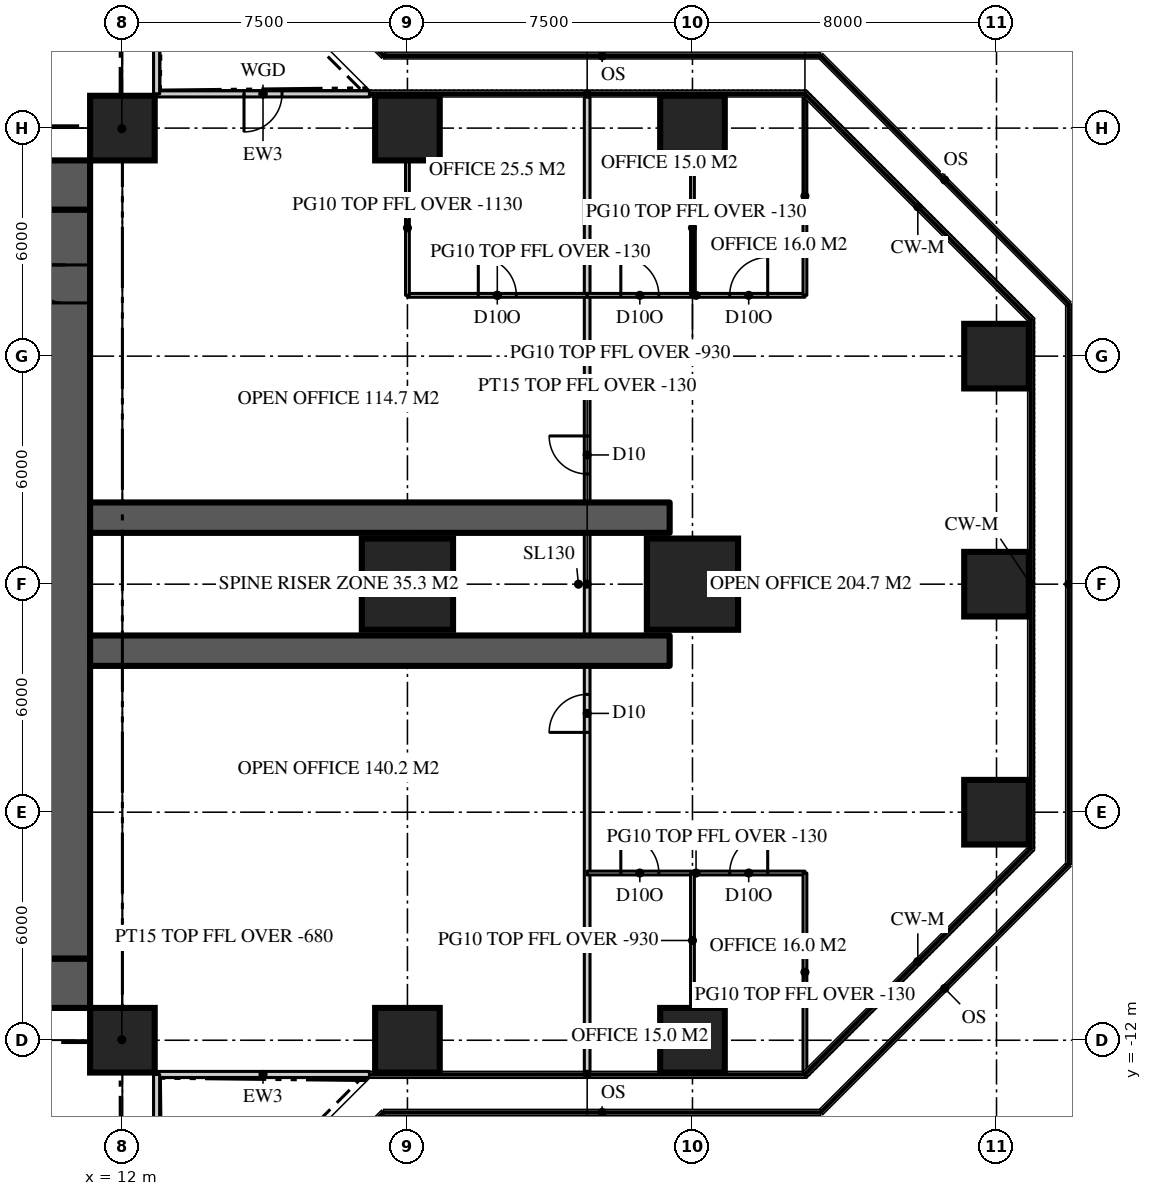
"""IFC4 building model, lengths in metres.
Left out: names, types, materials, properties, quantities, classifications, styles, units other than length and angle.
Written with IfcOpenShell. Run it as: python <this file> out.ifc"""

import sys

from ifc_helpers import new_model, si_unit, direction, frame, frame_2d, origin, origin_2d, place, context, subcontext, project, spatial, rectangle, extrude, element, fill, save


model = new_model("IFC4")
c1 = context("Model", 3, precision=1e-05, world=origin(), true_north=direction((0.0, 1.0)))
c2 = subcontext(c1, "Body", "Model", "MODEL_VIEW")
j1 = project(units=[si_unit("LENGTHUNIT", "METRE"), si_unit("PLANEANGLEUNIT", "RADIAN")], contexts=[c1])
p1 = place(None, origin())
s1 = spatial("IfcSite", under=j1, at=p1, CompositionType="ELEMENT")
p2 = place(p1, origin())
s2 = spatial("IfcBuilding", under=s1, at=p2, CompositionType="ELEMENT")
p3 = place(p2, frame((0.0, 0.0, 124.2)))
s3 = spatial("IfcBuildingStorey", under=s2, at=p3, CompositionType="ELEMENT", Elevation=124.2)
p4 = place(p3, frame((-11.15, 10.5, 0.0), z_axis=(0.0, 0.0, 1.0), x_axis=(1.0, 0.0, 0.0)))
e1 = element("IfcWall", 1, at=p4, inside=s3, PredefinedType="SHEAR", context=c2, shape_type="SweptSolid", body=[
    extrude(rectangle(XDim=22.3, YDim=1.3, at=frame_2d((11.15, 0.0))), origin(), (0.0, 0.0, 1.0), 3.9),
])
p5 = place(p4, frame((4.25, 0.0, 0.0)))
e2 = element("IfcOpeningElement", 2, at=p5, cuts=e1, PredefinedType="OPENING", context=c2, shape_type="SweptSolid", body=[
    extrude(rectangle(XDim=1.8, YDim=2.2, at=frame_2d((0.9, 1.1))), frame((0.0, 0.66, 0.0), z_axis=(0.0, -1.0, 0.0), x_axis=(1.0, 0.0, 0.0)), (0.0, 0.0, 1.0), 1.32),
])
p6 = place(p4, frame((16.25, 0.0, 0.0)))
e3 = element("IfcOpeningElement", 3, at=p6, cuts=e1, PredefinedType="OPENING", context=c2, shape_type="SweptSolid", body=[
    extrude(rectangle(XDim=1.8, YDim=2.2, at=frame_2d((0.9, 1.1))), frame((0.0, 0.66, 0.0), z_axis=(0.0, -1.0, 0.0), x_axis=(1.0, 0.0, 0.0)), (0.0, 0.0, 1.0), 1.32),
])
p7 = place(p3, frame((11.15, -10.5, 0.0), z_axis=(0.0, 0.0, 1.0), x_axis=(-1.0, 0.0, 0.0)))
e4 = element("IfcWall", 4, at=p7, inside=s3, PredefinedType="SHEAR", context=c2, shape_type="SweptSolid", body=[
    extrude(rectangle(XDim=22.3, YDim=1.3, at=frame_2d((11.15, 0.0))), origin(), (0.0, 0.0, 1.0), 3.9),
])
p8 = place(p7, frame((16.25, 0.0, 0.0)))
e5 = element("IfcOpeningElement", 5, at=p8, cuts=e4, PredefinedType="OPENING", context=c2, shape_type="SweptSolid", body=[
    extrude(rectangle(XDim=1.8, YDim=2.2, at=frame_2d((0.9, 1.1))), frame((0.0, 0.66, 0.0), z_axis=(0.0, -1.0, 0.0), x_axis=(1.0, 0.0, 0.0)), (0.0, 0.0, 1.0), 1.32),
])
p9 = place(p7, frame((4.25, 0.0, 0.0)))
e6 = element("IfcOpeningElement", 6, at=p9, cuts=e4, PredefinedType="OPENING", context=c2, shape_type="SweptSolid", body=[
    extrude(rectangle(XDim=1.8, YDim=2.2, at=frame_2d((0.9, 1.1))), frame((0.0, 0.66, 0.0), z_axis=(0.0, -1.0, 0.0), x_axis=(1.0, 0.0, 0.0)), (0.0, 0.0, 1.0), 1.32),
])
p10 = place(p3, frame((10.5, -9.85, 0.0), z_axis=(0.0, 0.0, 1.0), x_axis=(0.0, 1.0, 0.0)))
e7 = element("IfcWall", 7, at=p10, inside=s3, PredefinedType="SHEAR", context=c2, shape_type="SweptSolid", body=[
    extrude(rectangle(XDim=19.7, YDim=1.3, at=frame_2d((9.85, 0.0))), origin(), (0.0, 0.0, 1.0), 3.9),
])
p11 = place(p10, frame((17.25, 0.0, 0.0)))
e8 = element("IfcOpeningElement", 8, at=p11, cuts=e7, PredefinedType="OPENING", context=c2, shape_type="SweptSolid", body=[
    extrude(rectangle(XDim=1.0, YDim=2.2, at=frame_2d((0.5, 1.1))), frame((0.0, 0.66, 0.0), z_axis=(0.0, -1.0, 0.0), x_axis=(1.0, 0.0, 0.0)), (0.0, 0.0, 1.0), 1.32),
])
for number, where, z_axis, x_axis in (
    (9, (11.15, -1.75, 0.0), (0.0, 0.0, 1.0), (1.0, 0.0, 0.0)),
    (10, (11.15, 1.75, 0.0), (0.0, 0.0, 1.0), (1.0, 0.0, 0.0)),
):
    element("IfcWall", number, at=place(p3, frame(where, z_axis=z_axis, x_axis=x_axis)), inside=s3, PredefinedType="SHEAR", context=c2, shape_type="SweptSolid", body=[
        extrude(rectangle(XDim=15.25, YDim=0.8, at=frame_2d((7.625, 0.0))), origin(), (0.0, 0.0, 1.0), 3.9),
    ])
for number, where, z_axis, x_axis in (
    (11, (12.0, -12.0, 0.0), (0.0, 0.0, 1.0), (1.0, 0.0, 0.0)),
    (12, (19.5, -12.0, 0.0), (0.0, 0.0, 1.0), (1.0, 0.0, 0.0)),
    (13, (27.0, -12.0, 0.0), (0.0, 0.0, 1.0), (1.0, 0.0, 0.0)),
    (14, (35.0, -6.0, 0.0), (0.0, 0.0, 1.0), (1.0, 0.0, 0.0)),
):
    element("IfcColumn", number, at=place(p3, frame(where, z_axis=z_axis, x_axis=x_axis)), inside=s3, PredefinedType="COLUMN", context=c2, shape_type="SweptSolid", body=[
        extrude(rectangle(XDim=1.7, YDim=1.7, at=origin_2d()), origin(), (0.0, 0.0, 1.0), 3.9),
    ])
for number, where, z_axis, x_axis in (
    (15, (19.5, 0.0, 0.0), (0.0, 0.0, 1.0), (1.0, 0.0, 0.0)),
    (16, (27.0, 0.0, 0.0), (0.0, 0.0, 1.0), (1.0, 0.0, 0.0)),
):
    element("IfcColumn", number, at=place(p3, frame(where, z_axis=z_axis, x_axis=x_axis)), inside=s3, PredefinedType="COLUMN", context=c2, shape_type="SweptSolid", body=[
        extrude(rectangle(XDim=2.4, YDim=2.4, at=origin_2d()), origin(), (0.0, 0.0, 1.0), 3.9),
    ])
for number, where, z_axis, x_axis in (
    (17, (35.0, 0.0, 0.0), (0.0, 0.0, 1.0), (1.0, 0.0, 0.0)),
    (18, (35.0, 6.0, 0.0), (0.0, 0.0, 1.0), (1.0, 0.0, 0.0)),
    (19, (12.0, 12.0, 0.0), (0.0, 0.0, 1.0), (1.0, 0.0, 0.0)),
    (20, (19.5, 12.0, 0.0), (0.0, 0.0, 1.0), (1.0, 0.0, 0.0)),
    (21, (27.0, 12.0, 0.0), (0.0, 0.0, 1.0), (1.0, 0.0, 0.0)),
):
    element("IfcColumn", number, at=place(p3, frame(where, z_axis=z_axis, x_axis=x_axis)), inside=s3, PredefinedType="COLUMN", context=c2, shape_type="SweptSolid", body=[
        extrude(rectangle(XDim=1.7, YDim=1.7, at=origin_2d()), origin(), (0.0, 0.0, 1.0), 3.9),
    ])
p12 = place(p3, frame((12.9, -12.9, 0.0), z_axis=(0.0, 0.0, 1.0), x_axis=(1.0, 0.0, 0.0)))
e22 = element("IfcWall", 22, at=p12, inside=s3, PredefinedType="SOLIDWALL", context=c2, shape_type="SweptSolid", body=[
    extrude(rectangle(XDim=5.6, YDim=0.16, at=frame_2d((2.8, 0.0))), origin(), (0.0, 0.0, 1.0), 3.77),
])
p13 = place(p3, frame((18.5, 12.9, 0.0), z_axis=(0.0, 0.0, 1.0), x_axis=(-1.0, 0.0, 0.0)))
e23 = element("IfcWall", 23, at=p13, inside=s3, PredefinedType="SOLIDWALL", context=c2, shape_type="SweptSolid", body=[
    extrude(rectangle(XDim=5.6, YDim=0.16, at=frame_2d((2.8, 0.0))), origin(), (0.0, 0.0, 1.0), 3.77),
])
p14 = place(p13, frame((2.3, 0.0, 0.0)))
e24 = element("IfcOpeningElement", 24, at=p14, cuts=e23, PredefinedType="OPENING", context=c2, shape_type="SweptSolid", body=[
    extrude(rectangle(XDim=1.0, YDim=2.2, at=frame_2d((0.5, 1.1))), frame((0.0, 0.09, 0.0), z_axis=(0.0, -1.0, 0.0), x_axis=(1.0, 0.0, 0.0)), (0.0, 0.0, 1.0), 0.18),
])
p15 = place(p3, frame((12.9, 12.9, 0.0), z_axis=(0.0, 0.0, 1.0), x_axis=(0.0, 1.0, 0.0)))
e25 = element("IfcWall", 25, at=p15, inside=s3, PredefinedType="SOLIDWALL", context=c2, shape_type="SweptSolid", body=[
    extrude(rectangle(XDim=5.6, YDim=0.16, at=frame_2d((2.8, 0.0))), origin(), (0.0, 0.0, 1.0), 3.77),
])
p16 = place(p3, frame((12.9, -18.5, 0.0), z_axis=(0.0, 0.0, 1.0), x_axis=(0.0, 1.0, 0.0)))
e26 = element("IfcWall", 26, at=p16, inside=s3, PredefinedType="SOLIDWALL", context=c2, shape_type="SweptSolid", body=[
    extrude(rectangle(XDim=5.6, YDim=0.16, at=frame_2d((2.8, 0.0))), origin(), (0.0, 0.0, 1.0), 3.77),
])
p17 = place(p16, frame((2.3, 0.0, 0.0)))
e27 = element("IfcOpeningElement", 27, at=p17, cuts=e26, PredefinedType="OPENING", context=c2, shape_type="SweptSolid", body=[
    extrude(rectangle(XDim=1.0, YDim=2.2, at=frame_2d((0.5, 1.1))), frame((0.0, 0.09, 0.0), z_axis=(0.0, -1.0, 0.0), x_axis=(1.0, 0.0, 0.0)), (0.0, 0.0, 1.0), 0.18),
])
p18 = place(p3, frame((24.229, -12.82, 0.0), z_axis=(0.0, 0.0, 1.0), x_axis=(0.0, 1.0, 0.0)))
e28 = element("IfcWall", 28, at=p18, inside=s3, PredefinedType="PARTITIONING", context=c2, shape_type="SweptSolid", body=[
    extrude(rectangle(XDim=25.64, YDim=0.15, at=frame_2d((12.82, 0.0))), origin(), (0.0, 0.0, 1.0), 3.77),
])
p19 = place(p18, frame((15.72, 0.0, 0.0)))
e29 = element("IfcOpeningElement", 29, at=p19, cuts=e28, PredefinedType="OPENING", context=c2, shape_type="SweptSolid", body=[
    extrude(rectangle(XDim=1.0, YDim=2.2, at=frame_2d((0.5, 1.1))), frame((0.0, 0.085, 0.0), z_axis=(0.0, -1.0, 0.0), x_axis=(1.0, 0.0, 0.0)), (0.0, 0.0, 1.0), 0.17),
])
p20 = place(p18, frame((8.92, 0.0, 0.0)))
e30 = element("IfcOpeningElement", 30, at=p20, cuts=e28, PredefinedType="OPENING", context=c2, shape_type="SweptSolid", body=[
    extrude(rectangle(XDim=1.0, YDim=2.2, at=frame_2d((0.5, 1.1))), frame((0.0, 0.085, 0.0), z_axis=(0.0, -1.0, 0.0), x_axis=(1.0, 0.0, 0.0)), (0.0, 0.0, 1.0), 0.17),
])
p21 = place(p3, frame((19.5, 7.6, 0.0), z_axis=(0.0, 0.0, 1.0), x_axis=(1.0, 0.0, 0.0)))
e31 = element("IfcWall", 31, at=p21, inside=s3, PredefinedType="PARTITIONING", context=c2, shape_type="SweptSolid", body=[
    extrude(rectangle(XDim=4.729, YDim=0.1, at=frame_2d((2.365, 0.0))), origin(), (0.0, 0.0, 1.0), 3.77),
])
p22 = place(p21, frame((1.865, 0.0, 0.0)))
e32 = element("IfcOpeningElement", 32, at=p22, cuts=e31, PredefinedType="OPENING", context=c2, shape_type="SweptSolid", body=[
    extrude(rectangle(XDim=1.0, YDim=2.2, at=frame_2d((0.5, 1.1))), frame((0.0, 0.06, 0.0), z_axis=(0.0, -1.0, 0.0), x_axis=(1.0, 0.0, 0.0)), (0.0, 0.0, 1.0), 0.12),
])
p23 = place(p3, frame((24.229, 7.6, 0.0), z_axis=(0.0, 0.0, 1.0), x_axis=(1.0, 0.0, 0.0)))
e33 = element("IfcWall", 33, at=p23, inside=s3, PredefinedType="PARTITIONING", context=c2, shape_type="SweptSolid", body=[
    extrude(rectangle(XDim=5.73, YDim=0.1, at=frame_2d((2.865, 0.0))), origin(), (0.0, 0.0, 1.0), 3.77),
])
p24 = place(p23, frame((0.885, 0.0, 0.0)))
e34 = element("IfcOpeningElement", 34, at=p24, cuts=e33, PredefinedType="OPENING", context=c2, shape_type="SweptSolid", body=[
    extrude(rectangle(XDim=1.0, YDim=2.2, at=frame_2d((0.5, 1.1))), frame((0.0, 0.06, 0.0), z_axis=(0.0, -1.0, 0.0), x_axis=(1.0, 0.0, 0.0)), (0.0, 0.0, 1.0), 0.12),
])
p25 = place(p23, frame((3.75, 0.0, 0.0)))
e35 = element("IfcOpeningElement", 35, at=p25, cuts=e33, PredefinedType="OPENING", context=c2, shape_type="SweptSolid", body=[
    extrude(rectangle(XDim=1.0, YDim=2.2, at=frame_2d((0.5, 1.1))), frame((0.0, 0.06, 0.0), z_axis=(0.0, -1.0, 0.0), x_axis=(1.0, 0.0, 0.0)), (0.0, 0.0, 1.0), 0.12),
])
p26 = place(p3, frame((19.5, 7.6, 0.0), z_axis=(0.0, 0.0, 1.0), x_axis=(0.0, 1.0, 0.0)))
e36 = element("IfcWall", 36, at=p26, inside=s3, PredefinedType="PARTITIONING", context=c2, shape_type="SweptSolid", body=[
    extrude(rectangle(XDim=3.55, YDim=0.1, at=frame_2d((1.775, 0.0))), origin(), (0.0, 0.0, 1.0), 2.77),
])
p27 = place(p3, frame((27.0, 7.6, 0.0), z_axis=(0.0, 0.0, 1.0), x_axis=(0.0, 1.0, 0.0)))
e37 = element("IfcWall", 37, at=p27, inside=s3, PredefinedType="PARTITIONING", context=c2, shape_type="SweptSolid", body=[
    extrude(rectangle(XDim=3.55, YDim=0.1, at=frame_2d((1.775, 0.0))), origin(), (0.0, 0.0, 1.0), 2.97),
])
p28 = place(p3, frame((29.959, 7.6, 0.0), z_axis=(0.0, 0.0, 1.0), x_axis=(0.0, 1.0, 0.0)))
e38 = element("IfcWall", 38, at=p28, inside=s3, PredefinedType="PARTITIONING", context=c2, shape_type="SweptSolid", body=[
    extrude(rectangle(XDim=5.22, YDim=0.1, at=frame_2d((2.61, 0.0))), origin(), (0.0, 0.0, 1.0), 3.77),
])
p29 = place(p3, frame((24.229, -7.6, 0.0), z_axis=(0.0, 0.0, 1.0), x_axis=(1.0, 0.0, 0.0)))
e39 = element("IfcWall", 39, at=p29, inside=s3, PredefinedType="PARTITIONING", context=c2, shape_type="SweptSolid", body=[
    extrude(rectangle(XDim=5.73, YDim=0.1, at=frame_2d((2.865, 0.0))), origin(), (0.0, 0.0, 1.0), 3.77),
])
p30 = place(p29, frame((0.885, 0.0, 0.0)))
e40 = element("IfcOpeningElement", 40, at=p30, cuts=e39, PredefinedType="OPENING", context=c2, shape_type="SweptSolid", body=[
    extrude(rectangle(XDim=1.0, YDim=2.2, at=frame_2d((0.5, 1.1))), frame((0.0, 0.06, 0.0), z_axis=(0.0, -1.0, 0.0), x_axis=(1.0, 0.0, 0.0)), (0.0, 0.0, 1.0), 0.12),
])
p31 = place(p29, frame((3.75, 0.0, 0.0)))
e41 = element("IfcOpeningElement", 41, at=p31, cuts=e39, PredefinedType="OPENING", context=c2, shape_type="SweptSolid", body=[
    extrude(rectangle(XDim=1.0, YDim=2.2, at=frame_2d((0.5, 1.1))), frame((0.0, 0.06, 0.0), z_axis=(0.0, -1.0, 0.0), x_axis=(1.0, 0.0, 0.0)), (0.0, 0.0, 1.0), 0.12),
])
p32 = place(p3, frame((27.0, -7.6, 0.0), z_axis=(0.0, 0.0, 1.0), x_axis=(0.0, -1.0, 0.0)))
e42 = element("IfcWall", 42, at=p32, inside=s3, PredefinedType="PARTITIONING", context=c2, shape_type="SweptSolid", body=[
    extrude(rectangle(XDim=3.55, YDim=0.1, at=frame_2d((1.775, 0.0))), origin(), (0.0, 0.0, 1.0), 2.97),
])
p33 = place(p3, frame((29.959, -7.6, 0.0), z_axis=(0.0, 0.0, 1.0), x_axis=(0.0, -1.0, 0.0)))
e43 = element("IfcWall", 43, at=p33, inside=s3, PredefinedType="PARTITIONING", context=c2, shape_type="SweptSolid", body=[
    extrude(rectangle(XDim=5.22, YDim=0.1, at=frame_2d((2.61, 0.0))), origin(), (0.0, 0.0, 1.0), 3.77),
])
for number, where, z_axis, x_axis in (
    (44, (11.15, 11.15, 0.0), (0.0, 0.0, 1.0), (0.707, 0.707, 0.0)),
    (45, (11.15, -11.15, 0.0), (0.0, 0.0, 1.0), (0.707, -0.707, 0.0)),
):
    element("IfcWall", number, at=place(p3, frame(where, z_axis=z_axis, x_axis=x_axis)), inside=s3, PredefinedType="PARTITIONING", context=c2, shape_type="SweptSolid", body=[
        extrude(rectangle(XDim=2.362, YDim=0.15, at=frame_2d((1.181, 0.0))), origin(), (0.0, 0.0, 1.0), 3.22),
    ])
p34 = place(p14, origin())
e46 = element("IfcDoor", 46, at=p34, inside=s3, OperationType="SINGLE_SWING_RIGHT", PredefinedType="DOOR", context=c2, shape_type="SweptSolid", body=[
    extrude(rectangle(XDim=1.0, YDim=2.2, at=frame_2d((0.5, 1.1))), frame((0.0, 0.025, 0.0), z_axis=(0.0, -1.0, 0.0), x_axis=(1.0, 0.0, 0.0)), (0.0, 0.0, 1.0), 0.05),
])
fill(e24, e46)
p35 = place(p11, origin())
e47 = element("IfcDoor", 47, at=p35, inside=s3, OperationType="SINGLE_SWING_RIGHT", PredefinedType="DOOR", context=c2, shape_type="SweptSolid", body=[
    extrude(rectangle(XDim=1.0, YDim=2.2, at=frame_2d((0.5, 1.1))), frame((0.0, 0.025, 0.0), z_axis=(0.0, -1.0, 0.0), x_axis=(1.0, 0.0, 0.0)), (0.0, 0.0, 1.0), 0.05),
])
fill(e8, e47)
p36 = place(p19, origin())
e48 = element("IfcDoor", 48, at=p36, inside=s3, OperationType="SINGLE_SWING_RIGHT", PredefinedType="DOOR", context=c2, shape_type="SweptSolid", body=[
    extrude(rectangle(XDim=1.0, YDim=2.2, at=frame_2d((0.5, 1.1))), frame((0.0, 0.025, 0.0), z_axis=(0.0, -1.0, 0.0), x_axis=(1.0, 0.0, 0.0)), (0.0, 0.0, 1.0), 0.05),
])
fill(e29, e48)
p37 = place(p20, origin())
e49 = element("IfcDoor", 49, at=p37, inside=s3, OperationType="SINGLE_SWING_LEFT", PredefinedType="DOOR", context=c2, shape_type="SweptSolid", body=[
    extrude(rectangle(XDim=1.0, YDim=2.2, at=frame_2d((0.5, 1.1))), frame((0.0, 0.025, 0.0), z_axis=(0.0, -1.0, 0.0), x_axis=(1.0, 0.0, 0.0)), (0.0, 0.0, 1.0), 0.05),
])
fill(e30, e49)
p38 = place(p22, origin())
e50 = element("IfcDoor", 50, at=p38, inside=s3, OperationType="SINGLE_SWING_LEFT", PredefinedType="DOOR", context=c2, shape_type="SweptSolid", body=[
    extrude(rectangle(XDim=1.0, YDim=2.2, at=frame_2d((0.5, 1.1))), frame((0.0, 0.025, 0.0), z_axis=(0.0, -1.0, 0.0), x_axis=(1.0, 0.0, 0.0)), (0.0, 0.0, 1.0), 0.05),
])
fill(e32, e50)
p39 = place(p24, origin())
e51 = element("IfcDoor", 51, at=p39, inside=s3, OperationType="SINGLE_SWING_LEFT", PredefinedType="DOOR", context=c2, shape_type="SweptSolid", body=[
    extrude(rectangle(XDim=1.0, YDim=2.2, at=frame_2d((0.5, 1.1))), frame((0.0, 0.025, 0.0), z_axis=(0.0, -1.0, 0.0), x_axis=(1.0, 0.0, 0.0)), (0.0, 0.0, 1.0), 0.05),
])
fill(e34, e51)
p40 = place(p25, origin())
e52 = element("IfcDoor", 52, at=p40, inside=s3, OperationType="SINGLE_SWING_RIGHT", PredefinedType="DOOR", context=c2, shape_type="SweptSolid", body=[
    extrude(rectangle(XDim=1.0, YDim=2.2, at=frame_2d((0.5, 1.1))), frame((0.0, 0.025, 0.0), z_axis=(0.0, -1.0, 0.0), x_axis=(1.0, 0.0, 0.0)), (0.0, 0.0, 1.0), 0.05),
])
fill(e35, e52)
p41 = place(p30, origin())
e53 = element("IfcDoor", 53, at=p41, inside=s3, OperationType="SINGLE_SWING_LEFT", PredefinedType="DOOR", context=c2, shape_type="SweptSolid", body=[
    extrude(rectangle(XDim=1.0, YDim=2.2, at=frame_2d((0.5, 1.1))), frame((0.0, 0.025, 0.0), z_axis=(0.0, -1.0, 0.0), x_axis=(1.0, 0.0, 0.0)), (0.0, 0.0, 1.0), 0.05),
])
fill(e40, e53)
p42 = place(p31, origin())
e54 = element("IfcDoor", 54, at=p42, inside=s3, OperationType="SINGLE_SWING_RIGHT", PredefinedType="DOOR", context=c2, shape_type="SweptSolid", body=[
    extrude(rectangle(XDim=1.0, YDim=2.2, at=frame_2d((0.5, 1.1))), frame((0.0, 0.025, 0.0), z_axis=(0.0, -1.0, 0.0), x_axis=(1.0, 0.0, 0.0)), (0.0, 0.0, 1.0), 0.05),
])
fill(e41, e54)
save(model, sys.argv[1])
